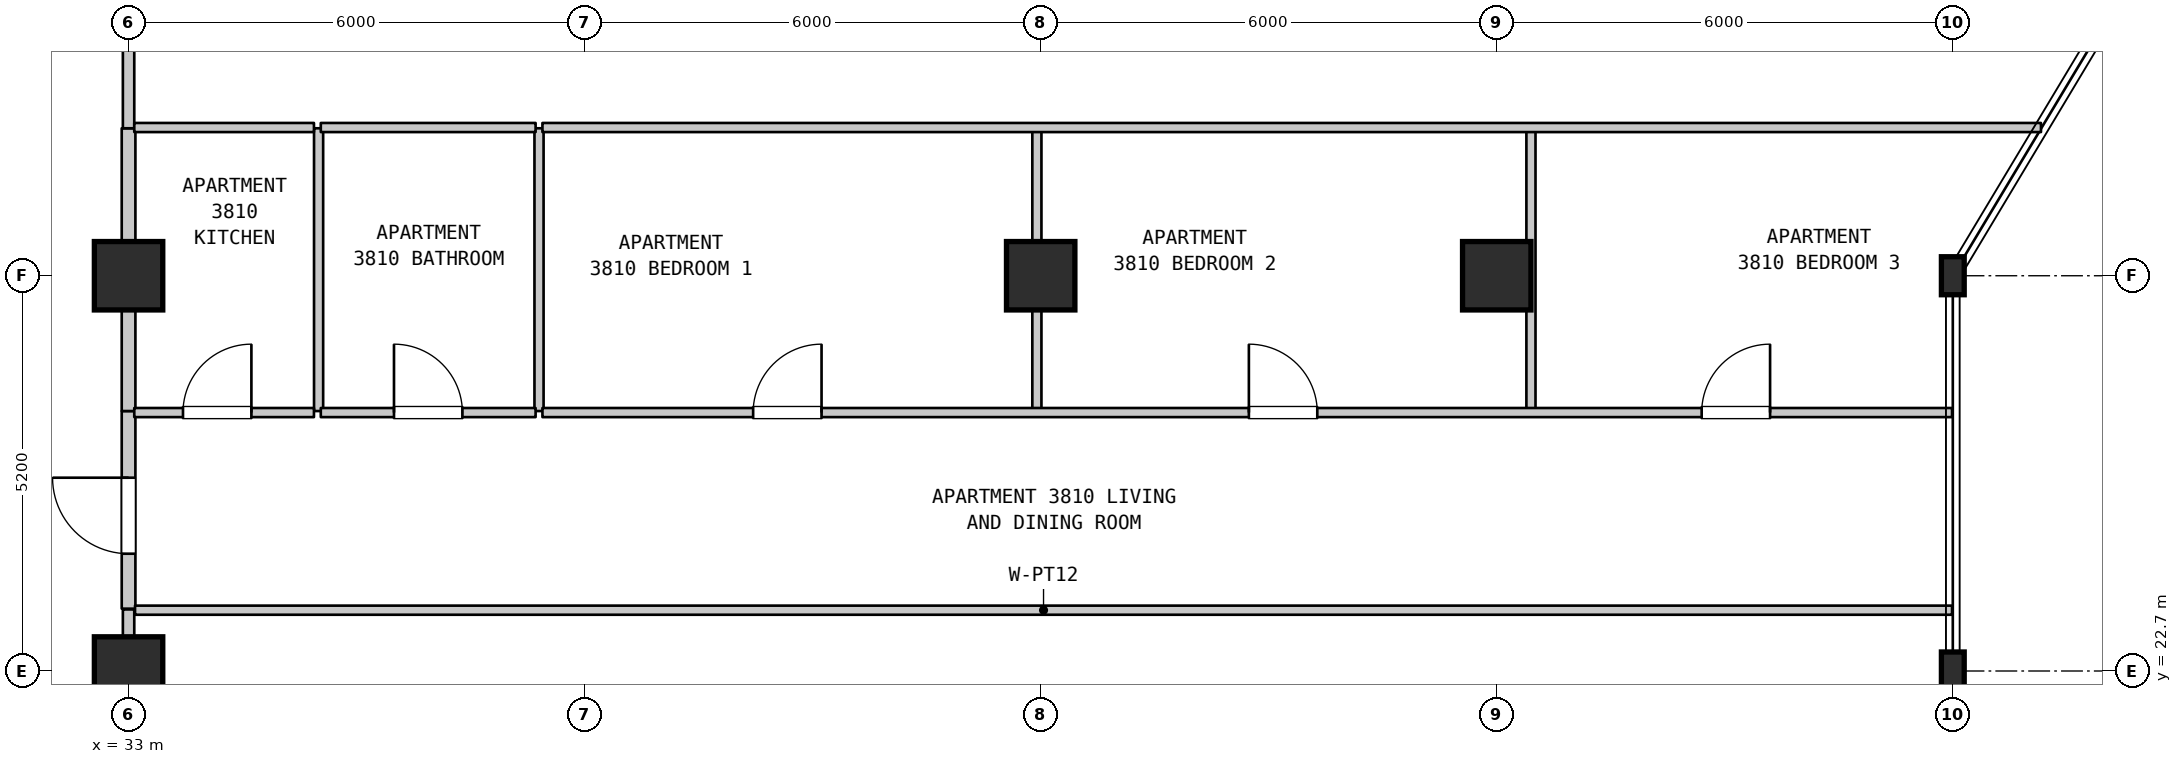
"""IFC4 building model, lengths in metres.
Left out: names, types, materials, properties, quantities, classifications, styles, units other than length and angle.
Written with IfcOpenShell. Run it as: python <this file> out.ifc"""

import sys

from ifc_helpers import new_model, si_unit, direction, frame, frame_2d, origin, origin_2d, place, context, subcontext, project, spatial, rectangle, i_section, extrude, element, fill, save


model = new_model("IFC4")
c1 = context("Model", 3, precision=1e-05, world=origin(), true_north=direction((0.0, 1.0)))
c2 = subcontext(c1, "Body", "Model", "MODEL_VIEW")
j1 = project(units=[si_unit("LENGTHUNIT", "METRE"), si_unit("PLANEANGLEUNIT", "RADIAN")], contexts=[c1])
p1 = place(None, origin())
s1 = spatial("IfcSite", under=j1, at=p1, CompositionType="ELEMENT")
p2 = place(p1, origin())
s2 = spatial("IfcBuilding", under=s1, at=p2, CompositionType="ELEMENT")
p3 = place(p2, frame((0.0, 0.0, 155.7)))
s3 = spatial("IfcBuildingStorey", under=s2, at=p3, CompositionType="ELEMENT", Elevation=155.7)
for number, where, z_axis, x_axis in (
    (1, (33.0, 22.7, 0.0), (0.0, 0.0, 1.0), (1.0, 0.0, 0.0)),
    (2, (33.0, 27.9, 0.0), (0.0, 0.0, 1.0), (1.0, 0.0, 0.0)),
    (3, (45.0, 27.9, 0.0), (0.0, 0.0, 1.0), (1.0, 0.0, 0.0)),
    (4, (51.0, 27.9, 0.0), (0.0, 0.0, 1.0), (1.0, 0.0, 0.0)),
):
    element("IfcColumn", number, at=place(p3, frame(where, z_axis=z_axis, x_axis=x_axis)), inside=s3, PredefinedType="COLUMN", context=c2, shape_type="SweptSolid", body=[
        extrude(rectangle(XDim=0.9, YDim=0.9, at=origin_2d()), origin(), (0.0, 0.0, 1.0), 3.7),
    ])
for number, where, z_axis, x_axis in (
    (5, (57.0, 22.7, 0.0), (0.0, 0.0, 1.0), (1.0, 0.0, 0.0)),
    (6, (57.0, 27.9, 0.0), (0.0, 0.0, 1.0), (1.0, 0.0, 0.0)),
):
    element("IfcColumn", number, at=place(p3, frame(where, z_axis=z_axis, x_axis=x_axis)), inside=s3, PredefinedType="COLUMN", context=c2, shape_type="SweptSolid", body=[
        extrude(i_section(OverallWidth=0.3, OverallDepth=0.5, WebThickness=0.014, FlangeThickness=0.028, FilletRadius=0.027, at=origin_2d()), origin(), (0.0, 0.0, 1.0), 3.7),
    ])
p4 = place(p3, frame((33.0, 19.51, 0.0), z_axis=(0.0, 0.0, 1.0), x_axis=(0.0, 1.0, 0.0)))
e7 = element("IfcWall", 7, at=p4, inside=s3, PredefinedType="STANDARD", context=c2, shape_type="SweptSolid", body=[
    extrude(rectangle(XDim=4.0, YDim=0.15, at=frame_2d((2.0, 0.0))), origin(), (0.0, 0.0, 1.0), 2.78),
])
p5 = place(p4, frame((1.427, 0.0, 0.0)))
e8 = element("IfcOpeningElement", 8, at=p5, cuts=e7, PredefinedType="OPENING", context=c2, shape_type="SweptSolid", body=[
    extrude(rectangle(XDim=1.0, YDim=2.15, at=frame_2d((0.5, 1.075))), frame((0.0, 0.085, 0.0), z_axis=(0.0, -1.0, 0.0), x_axis=(1.0, 0.0, 0.0)), (0.0, 0.0, 1.0), 0.17),
])
p6 = place(p3, frame((33.0, 23.52, 0.0), z_axis=(0.0, 0.0, 1.0), x_axis=(0.0, 1.0, 0.0)))
e9 = element("IfcWall", 9, at=p6, inside=s3, PredefinedType="STANDARD", context=c2, shape_type="SweptSolid", body=[
    extrude(rectangle(XDim=2.6, YDim=0.18, at=frame_2d((1.3, 0.0))), origin(), (0.0, 0.0, 1.0), 2.78),
])
p7 = place(p6, frame((0.723, 0.0, 0.0)))
e10 = element("IfcOpeningElement", 10, at=p7, cuts=e9, PredefinedType="OPENING", context=c2, shape_type="SweptSolid", body=[
    extrude(rectangle(XDim=1.0, YDim=2.15, at=frame_2d((0.5, 1.075))), frame((0.0, 0.1, 0.0), z_axis=(0.0, -1.0, 0.0), x_axis=(1.0, 0.0, 0.0)), (0.0, 0.0, 1.0), 0.2),
])
p8 = place(p3, frame((33.0, 26.12, 0.0), z_axis=(0.0, 0.0, 1.0), x_axis=(0.0, 1.0, 0.0)))
e11 = element("IfcWall", 11, at=p8, inside=s3, PredefinedType="STANDARD", context=c2, shape_type="SweptSolid", body=[
    extrude(rectangle(XDim=3.72, YDim=0.18, at=frame_2d((1.86, 0.0))), origin(), (0.0, 0.0, 1.0), 2.78),
])
p9 = place(p3, frame((33.0, 29.84, 0.0), z_axis=(0.0, 0.0, 1.0), x_axis=(0.0, 1.0, 0.0)))
e12 = element("IfcWall", 12, at=p9, inside=s3, PredefinedType="STANDARD", context=c2, shape_type="SweptSolid", body=[
    extrude(rectangle(XDim=8.06, YDim=0.15, at=frame_2d((4.03, 0.0))), origin(), (0.0, 0.0, 1.0), 2.78),
])
p10 = place(p9, frame((3.53, 0.0, 0.0)))
e13 = element("IfcOpeningElement", 13, at=p10, cuts=e12, PredefinedType="OPENING", context=c2, shape_type="SweptSolid", body=[
    extrude(rectangle(XDim=1.0, YDim=2.15, at=frame_2d((0.5, 1.075))), frame((0.0, 0.085, 0.0), z_axis=(0.0, -1.0, 0.0), x_axis=(1.0, 0.0, 0.0)), (0.0, 0.0, 1.0), 0.17),
])
for number, where, z_axis, x_axis in (
    (14, (35.5, 26.12, 0.0), (0.0, 0.0, 1.0), (0.0, 1.0, 0.0)),
    (15, (38.4, 26.12, 0.0), (0.0, 0.0, 1.0), (0.0, 1.0, 0.0)),
    (16, (44.95, 26.12, 0.0), (0.0, 0.0, 1.0), (0.0, 1.0, 0.0)),
    (17, (51.45, 26.12, 0.0), (0.0, 0.0, 1.0), (0.0, 1.0, 0.0)),
):
    element("IfcWall", number, at=place(p3, frame(where, z_axis=z_axis, x_axis=x_axis)), inside=s3, PredefinedType="PARTITIONING", context=c2, shape_type="SweptSolid", body=[
        extrude(rectangle(XDim=3.72, YDim=0.12, at=frame_2d((1.86, 0.0))), origin(), (0.0, 0.0, 1.0), 3.28),
    ])
p11 = place(p3, frame((33.085, 23.5, 0.0), z_axis=(0.0, 0.0, 1.0), x_axis=(1.0, 0.0, 0.0)))
e18 = element("IfcWall", 18, at=p11, inside=s3, PredefinedType="PARTITIONING", context=c2, shape_type="SweptSolid", body=[
    extrude(rectangle(XDim=23.905, YDim=0.12, at=frame_2d((11.953, 0.0))), origin(), (0.0, 0.0, 1.0), 3.28),
])
p12 = place(p3, frame((33.075, 26.1, 0.0), z_axis=(0.0, 0.0, 1.0), x_axis=(1.0, 0.0, 0.0)))
e19 = element("IfcWall", 19, at=p12, inside=s3, PredefinedType="PARTITIONING", context=c2, shape_type="SweptSolid", body=[
    extrude(rectangle(XDim=2.364, YDim=0.12, at=frame_2d((1.182, 0.0))), origin(), (0.0, 0.0, 1.0), 3.28),
])
p13 = place(p12, frame((0.641, 0.0, 0.0)))
e20 = element("IfcOpeningElement", 20, at=p13, cuts=e19, PredefinedType="OPENING", context=c2, shape_type="SweptSolid", body=[
    extrude(rectangle(XDim=0.9, YDim=2.15, at=frame_2d((0.45, 1.075))), frame((0.0, 0.07, 0.0), z_axis=(0.0, -1.0, 0.0), x_axis=(1.0, 0.0, 0.0)), (0.0, 0.0, 1.0), 0.14),
])
p14 = place(p3, frame((35.529, 26.1, 0.0), z_axis=(0.0, 0.0, 1.0), x_axis=(1.0, 0.0, 0.0)))
e21 = element("IfcWall", 21, at=p14, inside=s3, PredefinedType="PARTITIONING", context=c2, shape_type="SweptSolid", body=[
    extrude(rectangle(XDim=2.826, YDim=0.12, at=frame_2d((1.413, 0.0))), origin(), (0.0, 0.0, 1.0), 3.28),
])
p15 = place(p14, frame((0.963, 0.0, 0.0)))
e22 = element("IfcOpeningElement", 22, at=p15, cuts=e21, PredefinedType="OPENING", context=c2, shape_type="SweptSolid", body=[
    extrude(rectangle(XDim=0.9, YDim=2.1, at=frame_2d((0.45, 1.05))), frame((0.0, 0.07, 0.0), z_axis=(0.0, -1.0, 0.0), x_axis=(1.0, 0.0, 0.0)), (0.0, 0.0, 1.0), 0.14),
])
p16 = place(p3, frame((38.445, 26.1, 0.0), z_axis=(0.0, 0.0, 1.0), x_axis=(1.0, 0.0, 0.0)))
e23 = element("IfcWall", 23, at=p16, inside=s3, PredefinedType="PARTITIONING", context=c2, shape_type="SweptSolid", body=[
    extrude(rectangle(XDim=18.545, YDim=0.12, at=frame_2d((9.272, 0.0))), origin(), (0.0, 0.0, 1.0), 3.28),
])
p17 = place(p16, frame((2.772, 0.0, 0.0)))
e24 = element("IfcOpeningElement", 24, at=p17, cuts=e23, PredefinedType="OPENING", context=c2, shape_type="SweptSolid", body=[
    extrude(rectangle(XDim=0.9, YDim=2.15, at=frame_2d((0.45, 1.075))), frame((0.0, 0.07, 0.0), z_axis=(0.0, -1.0, 0.0), x_axis=(1.0, 0.0, 0.0)), (0.0, 0.0, 1.0), 0.14),
])
p18 = place(p16, frame((9.294, 0.0, 0.0)))
e25 = element("IfcOpeningElement", 25, at=p18, cuts=e23, PredefinedType="OPENING", context=c2, shape_type="SweptSolid", body=[
    extrude(rectangle(XDim=0.9, YDim=2.15, at=frame_2d((0.45, 1.075))), frame((0.0, 0.07, 0.0), z_axis=(0.0, -1.0, 0.0), x_axis=(1.0, 0.0, 0.0)), (0.0, 0.0, 1.0), 0.14),
])
p19 = place(p16, frame((15.251, 0.0, 0.0)))
e26 = element("IfcOpeningElement", 26, at=p19, cuts=e23, PredefinedType="OPENING", context=c2, shape_type="SweptSolid", body=[
    extrude(rectangle(XDim=0.9, YDim=2.15, at=frame_2d((0.45, 1.075))), frame((0.0, 0.07, 0.0), z_axis=(0.0, -1.0, 0.0), x_axis=(1.0, 0.0, 0.0)), (0.0, 0.0, 1.0), 0.14),
])
p20 = place(p3, frame((33.075, 29.85, 0.0), z_axis=(0.0, 0.0, 1.0), x_axis=(1.0, 0.0, 0.0)))
e27 = element("IfcWall", 27, at=p20, inside=s3, PredefinedType="PARTITIONING", context=c2, shape_type="SweptSolid", body=[
    extrude(rectangle(XDim=2.364, YDim=0.12, at=frame_2d((1.182, 0.0))), origin(), (0.0, 0.0, 1.0), 3.28),
])
p21 = place(p3, frame((35.529, 29.85, 0.0), z_axis=(0.0, 0.0, 1.0), x_axis=(1.0, 0.0, 0.0)))
e28 = element("IfcWall", 28, at=p21, inside=s3, PredefinedType="PARTITIONING", context=c2, shape_type="SweptSolid", body=[
    extrude(rectangle(XDim=2.826, YDim=0.12, at=frame_2d((1.413, 0.0))), origin(), (0.0, 0.0, 1.0), 3.28),
])
p22 = place(p3, frame((38.445, 29.85, 0.0), z_axis=(0.0, 0.0, 1.0), x_axis=(1.0, 0.0, 0.0)))
e29 = element("IfcWall", 29, at=p22, inside=s3, PredefinedType="PARTITIONING", context=c2, shape_type="SweptSolid", body=[
    extrude(rectangle(XDim=19.715, YDim=0.12, at=frame_2d((9.857, 0.0))), origin(), (0.0, 0.0, 1.0), 3.28),
])
p23 = place(p7, origin())
e30 = element("IfcDoor", 30, at=p23, inside=s3, OperationType="SINGLE_SWING_RIGHT", PredefinedType="DOOR", context=c2, shape_type="SweptSolid", body=[
    extrude(rectangle(XDim=1.0, YDim=2.15, at=frame_2d((0.5, 1.075))), frame((0.0, 0.025, 0.0), z_axis=(0.0, -1.0, 0.0), x_axis=(1.0, 0.0, 0.0)), (0.0, 0.0, 1.0), 0.05),
])
fill(e10, e30)
p24 = place(p13, origin())
e31 = element("IfcDoor", 31, at=p24, inside=s3, OperationType="SINGLE_SWING_RIGHT", PredefinedType="DOOR", context=c2, shape_type="SweptSolid", body=[
    extrude(rectangle(XDim=0.9, YDim=2.15, at=frame_2d((0.45, 1.075))), frame((0.0, 0.025, 0.0), z_axis=(0.0, -1.0, 0.0), x_axis=(1.0, 0.0, 0.0)), (0.0, 0.0, 1.0), 0.05),
])
fill(e20, e31)
p25 = place(p15, origin())
e32 = element("IfcDoor", 32, at=p25, inside=s3, OperationType="SINGLE_SWING_LEFT", PredefinedType="DOOR", context=c2, shape_type="SweptSolid", body=[
    extrude(rectangle(XDim=0.9, YDim=2.1, at=frame_2d((0.45, 1.05))), frame((0.0, 0.025, 0.0), z_axis=(0.0, -1.0, 0.0), x_axis=(1.0, 0.0, 0.0)), (0.0, 0.0, 1.0), 0.05),
])
fill(e22, e32)
p26 = place(p17, origin())
e33 = element("IfcDoor", 33, at=p26, inside=s3, OperationType="SINGLE_SWING_RIGHT", PredefinedType="DOOR", context=c2, shape_type="SweptSolid", body=[
    extrude(rectangle(XDim=0.9, YDim=2.15, at=frame_2d((0.45, 1.075))), frame((0.0, 0.025, 0.0), z_axis=(0.0, -1.0, 0.0), x_axis=(1.0, 0.0, 0.0)), (0.0, 0.0, 1.0), 0.05),
])
fill(e24, e33)
p27 = place(p18, origin())
e34 = element("IfcDoor", 34, at=p27, inside=s3, OperationType="SINGLE_SWING_LEFT", PredefinedType="DOOR", context=c2, shape_type="SweptSolid", body=[
    extrude(rectangle(XDim=0.9, YDim=2.15, at=frame_2d((0.45, 1.075))), frame((0.0, 0.025, 0.0), z_axis=(0.0, -1.0, 0.0), x_axis=(1.0, 0.0, 0.0)), (0.0, 0.0, 1.0), 0.05),
])
fill(e25, e34)
p28 = place(p19, origin())
e35 = element("IfcDoor", 35, at=p28, inside=s3, OperationType="SINGLE_SWING_RIGHT", PredefinedType="DOOR", context=c2, shape_type="SweptSolid", body=[
    extrude(rectangle(XDim=0.9, YDim=2.15, at=frame_2d((0.45, 1.075))), frame((0.0, 0.025, 0.0), z_axis=(0.0, -1.0, 0.0), x_axis=(1.0, 0.0, 0.0)), (0.0, 0.0, 1.0), 0.05),
])
fill(e26, e35)
save(model, sys.argv[1])
